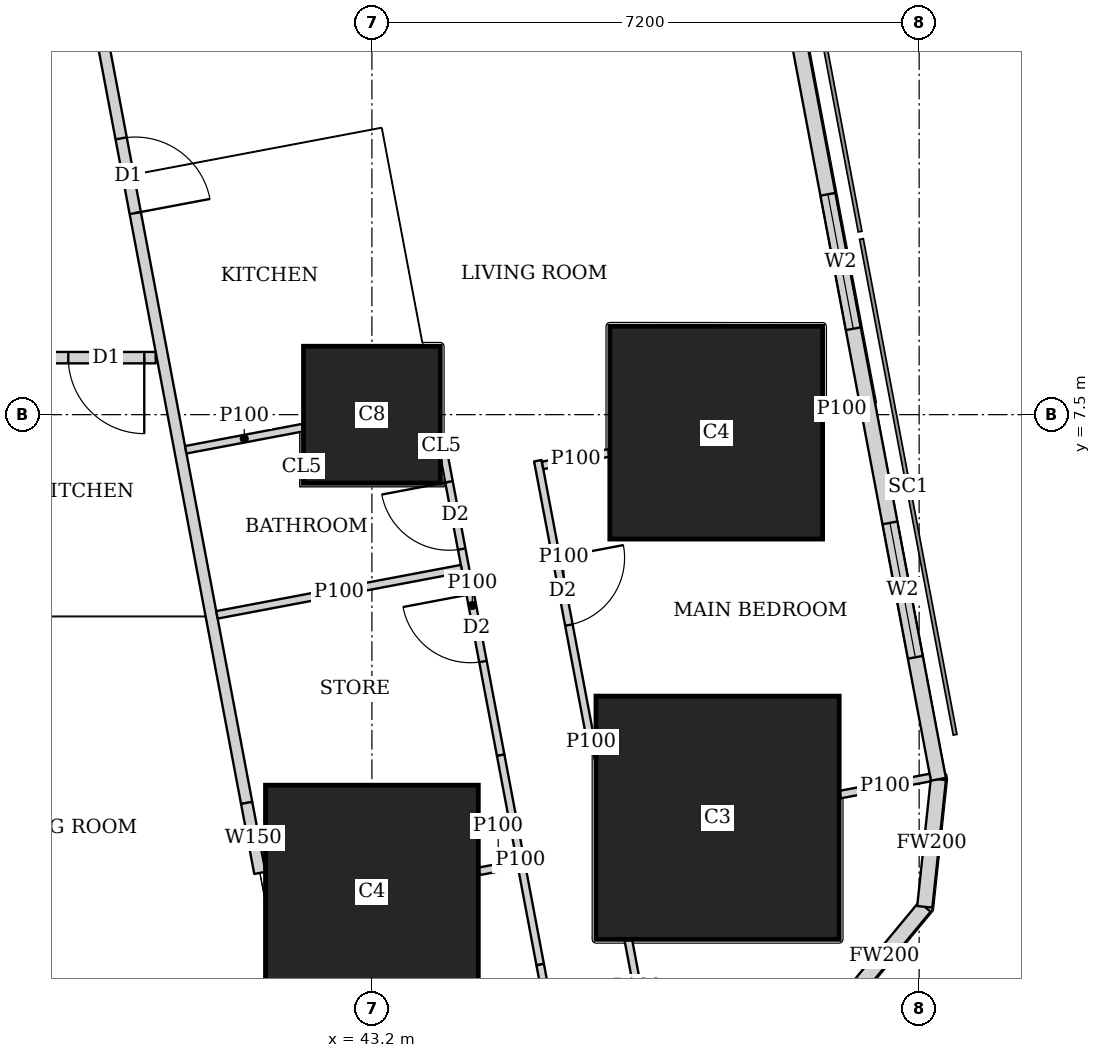
"""IFC4 building model, lengths in metres.
Left out: names, types, materials, properties, quantities, classifications, styles, units other than length and angle.
Written with IfcOpenShell. Run it as: python <this file> out.ifc"""

import sys

from ifc_helpers import new_model, si_unit, direction, frame, frame_2d, origin, origin_2d, place, context, subcontext, project, spatial, rectangle, extrude, element, fill, save


model = new_model("IFC4")
c1 = context("Model", 3, precision=1e-05, world=origin(), true_north=direction((0.0, 1.0)))
c2 = subcontext(c1, "Body", "Model", "MODEL_VIEW")
j1 = project(units=[si_unit("LENGTHUNIT", "METRE"), si_unit("PLANEANGLEUNIT", "RADIAN")], contexts=[c1])
p1 = place(None, origin())
s1 = spatial("IfcSite", under=j1, at=p1, CompositionType="ELEMENT")
p2 = place(p1, origin())
s2 = spatial("IfcBuilding", under=s1, at=p2, CompositionType="ELEMENT")
p3 = place(p2, frame((0.0, 0.0, 53.75)))
s3 = spatial("IfcBuildingStorey", under=s2, at=p3, CompositionType="ELEMENT", Elevation=53.75)
p4 = place(p3, frame((43.2, 1.225, 0.0), z_axis=(0.0, 0.0, 1.0), x_axis=(1.0, 0.0, 0.0)))
e1 = element("IfcColumn", 1, at=p4, inside=s3, PredefinedType="COLUMN", context=c2, shape_type="SweptSolid", body=[
    extrude(rectangle(XDim=2.8, YDim=2.8, at=origin_2d()), origin(), (0.0, 0.0, 1.0), 3.75),
])
p5 = place(p3, frame((47.748, 2.197, 0.0), z_axis=(0.0, 0.0, 1.0), x_axis=(1.0, 0.0, 0.0)))
e2 = element("IfcColumn", 2, at=p5, inside=s3, PredefinedType="COLUMN", context=c2, shape_type="SweptSolid", body=[
    extrude(rectangle(XDim=3.2, YDim=3.2, at=origin_2d()), origin(), (0.0, 0.0, 1.0), 3.75),
])
p6 = place(p3, frame((43.2, 7.5, 0.0), z_axis=(0.0, 0.0, 1.0), x_axis=(1.0, 0.0, 0.0)))
e3 = element("IfcColumn", 3, at=p6, inside=s3, PredefinedType="COLUMN", context=c2, shape_type="SweptSolid", body=[
    extrude(rectangle(XDim=1.8, YDim=1.8, at=origin_2d()), origin(), (0.0, 0.0, 1.0), 3.75),
])
p7 = place(p3, frame((47.73, 7.263, 0.0), z_axis=(0.0, 0.0, 1.0), x_axis=(1.0, 0.0, 0.0)))
e4 = element("IfcColumn", 4, at=p7, inside=s3, PredefinedType="COLUMN", context=c2, shape_type="SweptSolid", body=[
    extrude(rectangle(XDim=2.8, YDim=2.8, at=origin_2d()), origin(), (0.0, 0.0, 1.0), 3.75),
])
p8 = place(p3, frame((49.407, -0.263, 0.0), z_axis=(0.0, 0.0, 1.0), x_axis=(0.638042593423, 0.770001070764, 0.0)))
e5 = element("IfcWall", 5, at=p8, inside=s3, PredefinedType="SOLIDWALL", context=c2, shape_type="SweptSolid", body=[
    extrude(rectangle(XDim=1.673, YDim=0.2, at=frame_2d((0.836, 0.0))), origin(), (0.0, 0.0, 1.0), 3.5),
])
p9 = place(p3, frame((50.474, 1.025, 0.0), z_axis=(0.0, 0.0, 1.0), x_axis=(0.106047815515, 0.994361031429, 0.0)))
e6 = element("IfcWall", 6, at=p9, inside=s3, PredefinedType="SOLIDWALL", context=c2, shape_type="SweptSolid", body=[
    extrude(rectangle(XDim=1.688, YDim=0.2, at=frame_2d((0.844, 0.0))), origin(), (0.0, 0.0, 1.0), 3.5),
])
p10 = place(p3, frame((50.653, 2.703, 0.0), z_axis=(0.0, 0.0, 1.0), x_axis=(-0.185612026696, 0.982623109613, 0.0)))
e7 = element("IfcWall", 7, at=p10, inside=s3, PredefinedType="SOLIDWALL", context=c2, shape_type="SweptSolid", body=[
    extrude(rectangle(XDim=41.393, YDim=0.2, at=frame_2d((20.697, 0.0))), origin(), (0.0, 0.0, 1.0), 3.5),
])
p11 = place(p10, frame((1.633, 0.0, 0.9)))
e8 = element("IfcOpeningElement", 8, at=p11, cuts=e7, PredefinedType="OPENING", context=c2, shape_type="SweptSolid", body=[
    extrude(rectangle(XDim=1.8, YDim=1.5, at=frame_2d((0.9, 0.75))), frame((0.0, 0.11, 0.0), z_axis=(0.0, -1.0, 0.0), x_axis=(1.0, 0.0, 0.0)), (0.0, 0.0, 1.0), 0.22),
])
p12 = place(p10, frame((6.032, 0.0, 0.9)))
e9 = element("IfcOpeningElement", 9, at=p12, cuts=e7, PredefinedType="OPENING", context=c2, shape_type="SweptSolid", body=[
    extrude(rectangle(XDim=1.8, YDim=1.5, at=frame_2d((0.9, 0.75))), frame((0.0, 0.11, 0.0), z_axis=(0.0, -1.0, 0.0), x_axis=(1.0, 0.0, 0.0)), (0.0, 0.0, 1.0), 0.22),
])
p13 = place(p10, frame((9.848, 0.0, 0.9)))
e10 = element("IfcOpeningElement", 10, at=p13, cuts=e7, PredefinedType="OPENING", context=c2, shape_type="SweptSolid", body=[
    extrude(rectangle(XDim=1.8, YDim=1.5, at=frame_2d((0.9, 0.75))), frame((0.0, 0.11, 0.0), z_axis=(0.0, -1.0, 0.0), x_axis=(1.0, 0.0, 0.0)), (0.0, 0.0, 1.0), 0.22),
])
p14 = place(p10, frame((17.481, 0.0, 0.9)))
e11 = element("IfcOpeningElement", 11, at=p14, cuts=e7, PredefinedType="OPENING", context=c2, shape_type="SweptSolid", body=[
    extrude(rectangle(XDim=1.8, YDim=1.5, at=frame_2d((0.9, 0.75))), frame((0.0, 0.11, 0.0), z_axis=(0.0, -1.0, 0.0), x_axis=(1.0, 0.0, 0.0)), (0.0, 0.0, 1.0), 0.22),
])
p15 = place(p10, frame((21.297, 0.0, 0.9)))
e12 = element("IfcOpeningElement", 12, at=p15, cuts=e7, PredefinedType="OPENING", context=c2, shape_type="SweptSolid", body=[
    extrude(rectangle(XDim=1.8, YDim=1.5, at=frame_2d((0.9, 0.75))), frame((0.0, 0.11, 0.0), z_axis=(0.0, -1.0, 0.0), x_axis=(1.0, 0.0, 0.0)), (0.0, 0.0, 1.0), 0.22),
])
p16 = place(p10, frame((25.113, 0.0, 0.9)))
e13 = element("IfcOpeningElement", 13, at=p16, cuts=e7, PredefinedType="OPENING", context=c2, shape_type="SweptSolid", body=[
    extrude(rectangle(XDim=1.8, YDim=1.5, at=frame_2d((0.9, 0.75))), frame((0.0, 0.11, 0.0), z_axis=(0.0, -1.0, 0.0), x_axis=(1.0, 0.0, 0.0)), (0.0, 0.0, 1.0), 0.22),
])
p17 = place(p10, frame((28.93, 0.0, 0.9)))
e14 = element("IfcOpeningElement", 14, at=p17, cuts=e7, PredefinedType="OPENING", context=c2, shape_type="SweptSolid", body=[
    extrude(rectangle(XDim=1.8, YDim=1.5, at=frame_2d((0.9, 0.75))), frame((0.0, 0.11, 0.0), z_axis=(0.0, -1.0, 0.0), x_axis=(1.0, 0.0, 0.0)), (0.0, 0.0, 1.0), 0.22),
])
p18 = place(p10, frame((32.746, 0.0, 0.9)))
e15 = element("IfcOpeningElement", 15, at=p18, cuts=e7, PredefinedType="OPENING", context=c2, shape_type="SweptSolid", body=[
    extrude(rectangle(XDim=1.8, YDim=1.5, at=frame_2d((0.9, 0.75))), frame((0.0, 0.11, 0.0), z_axis=(0.0, -1.0, 0.0), x_axis=(1.0, 0.0, 0.0)), (0.0, 0.0, 1.0), 0.22),
])
p19 = place(p10, frame((36.481, 0.0, 0.9)))
e16 = element("IfcOpeningElement", 16, at=p19, cuts=e7, PredefinedType="OPENING", context=c2, shape_type="SweptSolid", body=[
    extrude(rectangle(XDim=1.8, YDim=1.5, at=frame_2d((0.9, 0.75))), frame((0.0, 0.11, 0.0), z_axis=(0.0, -1.0, 0.0), x_axis=(1.0, 0.0, 0.0)), (0.0, 0.0, 1.0), 0.22),
])
p20 = place(p3, frame((40.355, 8.25, 0.0), z_axis=(0.0, 0.0, 1.0), x_axis=(-1.0, 0.0, 0.0)))
e17 = element("IfcWall", 17, at=p20, inside=s3, PredefinedType="SOLIDWALL", context=c2, shape_type="SweptSolid", body=[
    extrude(rectangle(XDim=3.454, YDim=0.15, at=frame_2d((1.727, 0.0))), origin(), (0.0, 0.0, 1.0), 3.5),
])
p21 = place(p20, frame((0.15, 0.0, 0.0)))
e18 = element("IfcOpeningElement", 18, at=p21, cuts=e17, PredefinedType="OPENING", context=c2, shape_type="SweptSolid", body=[
    extrude(rectangle(XDim=1.0, YDim=2.1, at=frame_2d((0.5, 1.05))), frame((0.0, 0.085, 0.0), z_axis=(0.0, -1.0, 0.0), x_axis=(1.0, 0.0, 0.0)), (0.0, 0.0, 1.0), 0.17),
])
p22 = place(p3, frame((35.094, 36.585, 0.0), z_axis=(0.0, 0.0, 1.0), x_axis=(0.185588860311, -0.982627485331, 0.0)))
e19 = element("IfcWall", 19, at=p22, inside=s3, PredefinedType="SOLIDWALL", context=c2, shape_type="SweptSolid", body=[
    extrude(rectangle(XDim=34.797, YDim=0.15, at=frame_2d((17.399, 0.0))), origin(), (0.0, 0.0, 1.0), 2.5),
])
p23 = place(p22, frame((9.828, 0.0, 0.0)))
e20 = element("IfcOpeningElement", 20, at=p23, cuts=e19, PredefinedType="OPENING", context=c2, shape_type="SweptSolid", body=[
    extrude(rectangle(XDim=1.0, YDim=2.1, at=frame_2d((0.5, 1.05))), frame((0.0, 0.085, 0.0), z_axis=(0.0, -1.0, 0.0), x_axis=(1.0, 0.0, 0.0)), (0.0, 0.0, 1.0), 0.17),
])
p24 = place(p22, frame((13.645, 0.0, 0.0)))
e21 = element("IfcOpeningElement", 21, at=p24, cuts=e19, PredefinedType="OPENING", context=c2, shape_type="SweptSolid", body=[
    extrude(rectangle(XDim=1.0, YDim=2.1, at=frame_2d((0.5, 1.05))), frame((0.0, 0.085, 0.0), z_axis=(0.0, -1.0, 0.0), x_axis=(1.0, 0.0, 0.0)), (0.0, 0.0, 1.0), 0.17),
])
p25 = place(p22, frame((25.9, 0.0, 0.0)))
e22 = element("IfcOpeningElement", 22, at=p25, cuts=e19, PredefinedType="OPENING", context=c2, shape_type="SweptSolid", body=[
    extrude(rectangle(XDim=1.0, YDim=2.1, at=frame_2d((0.5, 1.05))), frame((0.0, 0.085, 0.0), z_axis=(0.0, -1.0, 0.0), x_axis=(1.0, 0.0, 0.0)), (0.0, 0.0, 1.0), 0.17),
])
p26 = place(p3, frame((41.552, 2.392, 0.0), z_axis=(0.0, 0.0, 1.0), x_axis=(0.185687800081, -0.982608793417, 0.0)))
e23 = element("IfcWall", 23, at=p26, inside=s3, PredefinedType="SOLIDWALL", context=c2, shape_type="SweptSolid", body=[
    extrude(rectangle(XDim=0.938, YDim=0.15, at=frame_2d((0.469, 0.0))), origin(), (0.0, 0.0, 1.0), 2.05),
])
p27 = place(p3, frame((45.383, 6.894, 0.0), z_axis=(0.0, 0.0, 1.0), x_axis=(0.185791461635, -0.982589198385, 0.0)))
e24 = element("IfcWall", 24, at=p27, inside=s3, PredefinedType="PARTITIONING", context=c2, shape_type="SweptSolid", body=[
    extrude(rectangle(XDim=3.687, YDim=0.1, at=frame_2d((1.844, 0.0))), origin(), (0.0, 0.0, 1.0), 3.5),
])
p28 = place(p27, frame((1.3, 0.0, 0.0)))
e25 = element("IfcOpeningElement", 25, at=p28, cuts=e24, PredefinedType="OPENING", context=c2, shape_type="SweptSolid", body=[
    extrude(rectangle(XDim=0.9, YDim=2.1, at=frame_2d((0.45, 1.05))), frame((0.0, 0.06, 0.0), z_axis=(0.0, -1.0, 0.0), x_axis=(1.0, 0.0, 0.0)), (0.0, 0.0, 1.0), 0.12),
])
p29 = place(p3, frame((46.068, 3.271, 0.0), z_axis=(0.0, 0.0, 1.0), x_axis=(0.183590240121, -0.98300286049, 0.0)))
e26 = element("IfcWall", 26, at=p29, inside=s3, PredefinedType="PARTITIONING", context=c2, shape_type="SweptSolid", body=[
    extrude(rectangle(XDim=0.169, YDim=0.1, at=frame_2d((0.084, 0.0))), origin(), (0.0, 0.0, 1.0), 2.05),
])
p30 = place(p3, frame((46.574, 0.587, 0.0), z_axis=(0.0, 0.0, 1.0), x_axis=(0.185997942803, -0.98255013372, 0.0)))
e27 = element("IfcWall", 27, at=p30, inside=s3, PredefinedType="PARTITIONING", context=c2, shape_type="SweptSolid", body=[
    extrude(rectangle(XDim=1.259, YDim=0.1, at=frame_2d((0.629, 0.0))), origin(), (0.0, 0.0, 1.0), 2.05),
])
p31 = place(p3, frame((44.149, 6.96, 0.0), z_axis=(0.0, 0.0, 1.0), x_axis=(0.185824941804, -0.982582867245, 0.0)))
e28 = element("IfcWall", 28, at=p31, inside=s3, PredefinedType="PARTITIONING", context=c2, shape_type="SweptSolid", body=[
    extrude(rectangle(XDim=4.01, YDim=0.1, at=frame_2d((2.005, 0.0))), origin(), (0.0, 0.0, 1.0), 3.5),
])
p32 = place(p31, frame((0.35, 0.0, 0.0)))
e29 = element("IfcOpeningElement", 29, at=p32, cuts=e28, PredefinedType="OPENING", context=c2, shape_type="SweptSolid", body=[
    extrude(rectangle(XDim=0.9, YDim=2.1, at=frame_2d((0.45, 1.05))), frame((0.0, 0.06, 0.0), z_axis=(0.0, -1.0, 0.0), x_axis=(1.0, 0.0, 0.0)), (0.0, 0.0, 1.0), 0.12),
])
p33 = place(p31, frame((1.856, 0.0, 0.0)))
e30 = element("IfcOpeningElement", 30, at=p33, cuts=e28, PredefinedType="OPENING", context=c2, shape_type="SweptSolid", body=[
    extrude(rectangle(XDim=0.9, YDim=2.1, at=frame_2d((0.45, 1.05))), frame((0.0, 0.06, 0.0), z_axis=(0.0, -1.0, 0.0), x_axis=(1.0, 0.0, 0.0)), (0.0, 0.0, 1.0), 0.12),
])
p34 = place(p3, frame((44.894, 3.02, 0.0), z_axis=(0.0, 0.0, 1.0), x_axis=(0.185471317237, -0.982649678412, 0.0)))
e31 = element("IfcWall", 31, at=p34, inside=s3, PredefinedType="PARTITIONING", context=c2, shape_type="SweptSolid", body=[
    extrude(rectangle(XDim=2.804, YDim=0.1, at=frame_2d((1.402, 0.0))), origin(), (0.0, 0.0, 1.0), 2.05),
])
p35 = place(p3, frame((45.414, 0.265, 0.0), z_axis=(0.0, 0.0, 1.0), x_axis=(0.185665855771, -0.982612940074, 0.0)))
e32 = element("IfcWall", 32, at=p35, inside=s3, PredefinedType="PARTITIONING", context=c2, shape_type="SweptSolid", body=[
    extrude(rectangle(XDim=0.931, YDim=0.1, at=frame_2d((0.465, 0.0))), origin(), (0.0, 0.0, 1.0), 3.5),
])
p36 = place(p3, frame((49.622, 7.62, 0.0), z_axis=(0.0, 0.0, 1.0), x_axis=(-0.982629142467, -0.185580086147, 0.0)))
e33 = element("IfcWall", 33, at=p36, inside=s3, PredefinedType="PARTITIONING", context=c2, shape_type="SweptSolid", body=[
    extrude(rectangle(XDim=0.491, YDim=0.1, at=frame_2d((0.245, 0.0))), origin(), (0.0, 0.0, 1.0), 3.5),
])
p37 = place(p3, frame((46.32, 6.997, 0.0), z_axis=(0.0, 0.0, 1.0), x_axis=(-0.982635224332, -0.185547880349, 0.0)))
e34 = element("IfcWall", 34, at=p37, inside=s3, PredefinedType="PARTITIONING", context=c2, shape_type="SweptSolid", body=[
    extrude(rectangle(XDim=0.889, YDim=0.1, at=frame_2d((0.445, 0.0))), origin(), (0.0, 0.0, 1.0), 3.5),
])
p38 = place(p3, frame((50.547, 2.726, 0.0), z_axis=(0.0, 0.0, 1.0), x_axis=(-0.982553313503, -0.185981144539, 0.0)))
e35 = element("IfcWall", 35, at=p38, inside=s3, PredefinedType="PARTITIONING", context=c2, shape_type="SweptSolid", body=[
    extrude(rectangle(XDim=1.21, YDim=0.1, at=frame_2d((0.605, 0.0))), origin(), (0.0, 0.0, 1.0), 3.5),
])
p39 = place(p3, frame((42.29, 7.329, 0.0), z_axis=(0.0, 0.0, 1.0), x_axis=(-0.98258870752, -0.18579405764, 0.0)))
e36 = element("IfcWall", 36, at=p39, inside=s3, PredefinedType="PARTITIONING", context=c2, shape_type="SweptSolid", body=[
    extrude(rectangle(XDim=1.566, YDim=0.1, at=frame_2d((0.783, 0.0))), origin(), (0.0, 0.0, 1.0), 3.5),
])
p40 = place(p3, frame((45.114, 1.587, 0.0), z_axis=(0.0, 0.0, 1.0), x_axis=(-0.982699277433, -0.185208342501, 0.0)))
e37 = element("IfcWall", 37, at=p40, inside=s3, PredefinedType="PARTITIONING", context=c2, shape_type="SweptSolid", body=[
    extrude(rectangle(XDim=0.513, YDim=0.1, at=frame_2d((0.256, 0.0))), origin(), (0.0, 0.0, 1.0), 2.05),
])
p41 = place(p3, frame((44.379, 5.474, 0.0), z_axis=(0.0, 0.0, 1.0), x_axis=(-0.982607026909, -0.185697147715, 0.0)))
e38 = element("IfcWall", 38, at=p41, inside=s3, PredefinedType="PARTITIONING", context=c2, shape_type="SweptSolid", body=[
    extrude(rectangle(XDim=3.275, YDim=0.1, at=frame_2d((1.637, 0.0))), origin(), (0.0, 0.0, 1.0), 3.5),
])
p42 = place(p11, origin())
e39 = element("IfcWindow", 39, at=p42, inside=s3, PartitioningType="SINGLE_PANEL", PredefinedType="WINDOW", context=c2, shape_type="SweptSolid", body=[
    extrude(rectangle(XDim=1.8, YDim=1.5, at=frame_2d((0.9, 0.75))), frame((0.0, 0.03, 0.0), z_axis=(0.0, -1.0, 0.0), x_axis=(1.0, 0.0, 0.0)), (0.0, 0.0, 1.0), 0.06),
])
fill(e8, e39)
p43 = place(p12, origin())
e40 = element("IfcWindow", 40, at=p43, inside=s3, PartitioningType="SINGLE_PANEL", PredefinedType="WINDOW", context=c2, shape_type="SweptSolid", body=[
    extrude(rectangle(XDim=1.8, YDim=1.5, at=frame_2d((0.9, 0.75))), frame((0.0, 0.03, 0.0), z_axis=(0.0, -1.0, 0.0), x_axis=(1.0, 0.0, 0.0)), (0.0, 0.0, 1.0), 0.06),
])
fill(e9, e40)
p44 = place(p21, origin())
e41 = element("IfcDoor", 41, at=p44, inside=s3, OperationType="SINGLE_SWING_LEFT", PredefinedType="DOOR", context=c2, shape_type="SweptSolid", body=[
    extrude(rectangle(XDim=1.0, YDim=2.1, at=frame_2d((0.5, 1.05))), frame((0.0, 0.025, 0.0), z_axis=(0.0, -1.0, 0.0), x_axis=(1.0, 0.0, 0.0)), (0.0, 0.0, 1.0), 0.05),
])
fill(e18, e41)
p45 = place(p28, origin())
e42 = element("IfcDoor", 42, at=p45, inside=s3, OperationType="SINGLE_SWING_LEFT", PredefinedType="DOOR", context=c2, shape_type="SweptSolid", body=[
    extrude(rectangle(XDim=0.9, YDim=2.1, at=frame_2d((0.45, 1.05))), frame((0.0, 0.025, 0.0), z_axis=(0.0, -1.0, 0.0), x_axis=(1.0, 0.0, 0.0)), (0.0, 0.0, 1.0), 0.05),
])
fill(e25, e42)
p46 = place(p32, origin())
e43 = element("IfcDoor", 43, at=p46, inside=s3, OperationType="SINGLE_SWING_RIGHT", PredefinedType="DOOR", context=c2, shape_type="SweptSolid", body=[
    extrude(rectangle(XDim=0.9, YDim=2.1, at=frame_2d((0.45, 1.05))), frame((0.0, 0.025, 0.0), z_axis=(0.0, -1.0, 0.0), x_axis=(1.0, 0.0, 0.0)), (0.0, 0.0, 1.0), 0.05),
])
fill(e29, e43)
p47 = place(p33, origin())
e44 = element("IfcDoor", 44, at=p47, inside=s3, OperationType="SINGLE_SWING_RIGHT", PredefinedType="DOOR", context=c2, shape_type="SweptSolid", body=[
    extrude(rectangle(XDim=0.9, YDim=2.1, at=frame_2d((0.45, 1.05))), frame((0.0, 0.025, 0.0), z_axis=(0.0, -1.0, 0.0), x_axis=(1.0, 0.0, 0.0)), (0.0, 0.0, 1.0), 0.05),
])
fill(e30, e44)
p48 = place(p25, origin())
e45 = element("IfcDoor", 45, at=p48, inside=s3, OperationType="SINGLE_SWING_RIGHT", PredefinedType="DOOR", context=c2, shape_type="SweptSolid", body=[
    extrude(rectangle(XDim=1.0, YDim=2.1, at=frame_2d((0.5, 1.05))), frame((0.0, 0.025, 0.0), z_axis=(0.0, -1.0, 0.0), x_axis=(1.0, 0.0, 0.0)), (0.0, 0.0, 1.0), 0.05),
])
fill(e22, e45)
save(model, sys.argv[1])
